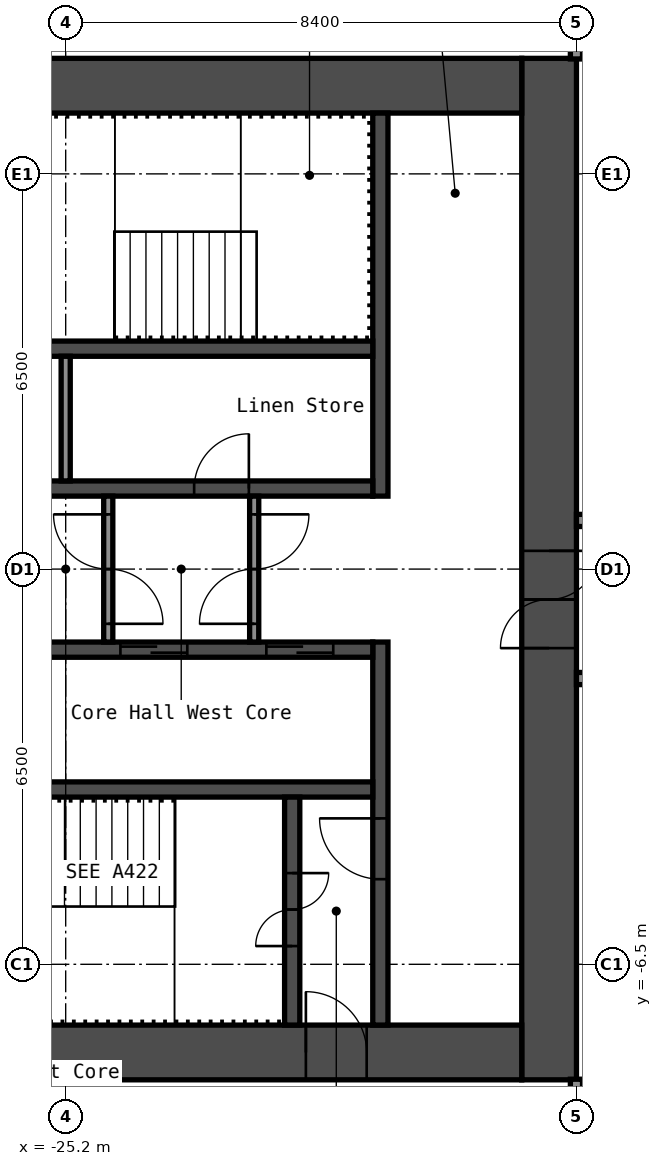
"""IFC4 building model, lengths in metres.
Left out: names, types, materials, properties, quantities, classifications, styles, units other than length and angle.
Written with IfcOpenShell. Run it as: python <this file> out.ifc"""

import sys

from ifc_helpers import new_model, si_unit, direction, frame, frame_2d, origin, place, context, subcontext, project, spatial, rectangle, extrude, element, fill, save


model = new_model("IFC4")
c1 = context("Model", 3, precision=1e-05, world=origin(), true_north=direction((0.0, 1.0)))
c2 = subcontext(c1, "Body", "Model", "MODEL_VIEW")
j1 = project(units=[si_unit("LENGTHUNIT", "METRE"), si_unit("PLANEANGLEUNIT", "RADIAN")], contexts=[c1])
p1 = place(None, origin())
s1 = spatial("IfcSite", under=j1, at=p1, CompositionType="ELEMENT")
p2 = place(p1, origin())
s2 = spatial("IfcBuilding", under=s1, at=p2, CompositionType="ELEMENT")
p3 = place(p2, frame((0.0, 0.0, 143.8)))
s3 = spatial("IfcBuildingStorey", under=s2, at=p3, CompositionType="ELEMENT", Elevation=143.8)
p4 = place(p3, frame((-17.25, -8.4, 0.0), z_axis=(0.0, 0.0, 1.0), x_axis=(0.0, 1.0, 0.0)))
e1 = element("IfcWall", 1, at=p4, inside=s3, PredefinedType="SHEAR", context=c2, shape_type="SweptSolid", body=[
    extrude(rectangle(XDim=16.8, YDim=0.9, at=frame_2d((8.4, 0.0))), origin(), (0.0, 0.0, 1.0), 2.75),
])
p5 = place(p4, frame((7.1, 0.0, 0.0)))
e2 = element("IfcOpeningElement", 2, at=p5, cuts=e1, PredefinedType="OPENING", context=c2, shape_type="SweptSolid", body=[
    extrude(rectangle(XDim=1.6, YDim=2.1, at=frame_2d((0.8, 1.05))), frame((0.0, 0.46, 0.0), z_axis=(0.0, -1.0, 0.0), x_axis=(1.0, 0.0, 0.0)), (0.0, 0.0, 1.0), 0.92),
])
p6 = place(p3, frame((-32.7, 7.95, 0.0), z_axis=(0.0, 0.0, 1.0), x_axis=(1.0, 0.0, 0.0)))
e3 = element("IfcWall", 3, at=p6, inside=s3, PredefinedType="SHEAR", context=c2, shape_type="SweptSolid", body=[
    extrude(rectangle(XDim=15.0, YDim=0.9, at=frame_2d((7.5, 0.0))), origin(), (0.0, 0.0, 1.0), 2.75),
])
p7 = place(p6, frame((3.4, 0.0, 0.0)))
e4 = element("IfcOpeningElement", 4, at=p7, cuts=e3, PredefinedType="OPENING", context=c2, shape_type="SweptSolid", body=[
    extrude(rectangle(XDim=1.2, YDim=2.1, at=frame_2d((0.6, 1.05))), frame((0.0, 0.46, 0.0), z_axis=(0.0, -1.0, 0.0), x_axis=(1.0, 0.0, 0.0)), (0.0, 0.0, 1.0), 0.92),
])
p8 = place(p6, frame((0.75, 0.0, 0.0)))
e5 = element("IfcOpeningElement", 5, at=p8, cuts=e3, PredefinedType="OPENING", context=c2, shape_type="SweptSolid", body=[
    extrude(rectangle(XDim=0.9, YDim=2.1, at=frame_2d((0.45, 1.05))), frame((0.0, 0.46, 0.0), z_axis=(0.0, -1.0, 0.0), x_axis=(1.0, 0.0, 0.0)), (0.0, 0.0, 1.0), 0.92),
])
p9 = place(p3, frame((-32.7, -7.95, 0.0), z_axis=(0.0, 0.0, 1.0), x_axis=(1.0, 0.0, 0.0)))
e6 = element("IfcWall", 6, at=p9, inside=s3, PredefinedType="SHEAR", context=c2, shape_type="SweptSolid", body=[
    extrude(rectangle(XDim=15.0, YDim=0.9, at=frame_2d((7.5, 0.0))), origin(), (0.0, 0.0, 1.0), 2.75),
])
p10 = place(p9, frame((11.45, 0.0, 0.0)))
e7 = element("IfcOpeningElement", 7, at=p10, cuts=e6, PredefinedType="OPENING", context=c2, shape_type="SweptSolid", body=[
    extrude(rectangle(XDim=1.0, YDim=2.1, at=frame_2d((0.5, 1.05))), frame((0.0, 0.46, 0.0), z_axis=(0.0, -1.0, 0.0), x_axis=(1.0, 0.0, 0.0)), (0.0, 0.0, 1.0), 0.92),
])
p11 = place(p3, frame((-20.025, 1.2, 0.0), z_axis=(0.0, 0.0, 1.0), x_axis=(0.0, 1.0, 0.0)))
e8 = element("IfcWall", 8, at=p11, inside=s3, PredefinedType="SHEAR", context=c2, shape_type="SweptSolid", body=[
    extrude(rectangle(XDim=6.3, YDim=0.25, at=frame_2d((3.15, 0.0))), origin(), (0.0, 0.0, 1.0), 2.75),
])
p12 = place(p3, frame((-20.025, -7.5, 0.0), z_axis=(0.0, 0.0, 1.0), x_axis=(0.0, 1.0, 0.0)))
e9 = element("IfcWall", 9, at=p12, inside=s3, PredefinedType="SHEAR", context=c2, shape_type="SweptSolid", body=[
    extrude(rectangle(XDim=6.3, YDim=0.25, at=frame_2d((3.15, 0.0))), origin(), (0.0, 0.0, 1.0), 2.75),
])
p13 = place(p12, frame((2.4, 0.0, 0.0)))
e10 = element("IfcOpeningElement", 10, at=p13, cuts=e9, PredefinedType="OPENING", context=c2, shape_type="SweptSolid", body=[
    extrude(rectangle(XDim=1.0, YDim=2.1, at=frame_2d((0.5, 1.05))), frame((0.0, 0.135, 0.0), z_axis=(0.0, -1.0, 0.0), x_axis=(1.0, 0.0, 0.0)), (0.0, 0.0, 1.0), 0.27),
])
p14 = place(p3, frame((-27.65, 1.325, 0.0), z_axis=(0.0, 0.0, 1.0), x_axis=(1.0, 0.0, 0.0)))
e11 = element("IfcWall", 11, at=p14, inside=s3, PredefinedType="SHEAR", context=c2, shape_type="SweptSolid", body=[
    extrude(rectangle(XDim=7.5, YDim=0.25, at=frame_2d((3.75, 0.0))), origin(), (0.0, 0.0, 1.0), 2.75),
])
p15 = place(p14, frame((4.562, 0.0, 0.0)))
e12 = element("IfcOpeningElement", 12, at=p15, cuts=e11, PredefinedType="OPENING", context=c2, shape_type="SweptSolid", body=[
    extrude(rectangle(XDim=0.9, YDim=2.1, at=frame_2d((0.45, 1.05))), frame((0.0, 0.135, 0.0), z_axis=(0.0, -1.0, 0.0), x_axis=(1.0, 0.0, 0.0)), (0.0, 0.0, 1.0), 0.27),
])
p16 = place(p14, frame((0.863, 0.0, 0.0)))
e13 = element("IfcOpeningElement", 13, at=p16, cuts=e11, PredefinedType="OPENING", context=c2, shape_type="SweptSolid", body=[
    extrude(rectangle(XDim=0.9, YDim=2.1, at=frame_2d((0.45, 1.05))), frame((0.0, 0.135, 0.0), z_axis=(0.0, -1.0, 0.0), x_axis=(1.0, 0.0, 0.0)), (0.0, 0.0, 1.0), 0.27),
])
p17 = place(p3, frame((-27.65, 3.625, 0.0), z_axis=(0.0, 0.0, 1.0), x_axis=(1.0, 0.0, 0.0)))
e14 = element("IfcWall", 14, at=p17, inside=s3, PredefinedType="SHEAR", context=c2, shape_type="SweptSolid", body=[
    extrude(rectangle(XDim=7.5, YDim=0.25, at=frame_2d((3.75, 0.0))), origin(), (0.0, 0.0, 1.0), 2.75),
])
p18 = place(p3, frame((-27.65, -1.325, 0.0), z_axis=(0.0, 0.0, 1.0), x_axis=(1.0, 0.0, 0.0)))
e15 = element("IfcWall", 15, at=p18, inside=s3, PredefinedType="SHEAR", context=c2, shape_type="SweptSolid", body=[
    extrude(rectangle(XDim=7.5, YDim=0.25, at=frame_2d((3.75, 0.0))), origin(), (0.0, 0.0, 1.0), 2.75),
])
p19 = place(p18, frame((5.75, 0.0, 0.0)))
e16 = element("IfcOpeningElement", 16, at=p19, cuts=e15, PredefinedType="OPENING", context=c2, shape_type="SweptSolid", body=[
    extrude(rectangle(XDim=1.1, YDim=2.1, at=frame_2d((0.55, 1.05))), frame((0.0, 0.135, 0.0), z_axis=(0.0, -1.0, 0.0), x_axis=(1.0, 0.0, 0.0)), (0.0, 0.0, 1.0), 0.27),
])
p20 = place(p18, frame((3.35, 0.0, 0.0)))
e17 = element("IfcOpeningElement", 17, at=p20, cuts=e15, PredefinedType="OPENING", context=c2, shape_type="SweptSolid", body=[
    extrude(rectangle(XDim=1.1, YDim=2.1, at=frame_2d((0.55, 1.05))), frame((0.0, 0.135, 0.0), z_axis=(0.0, -1.0, 0.0), x_axis=(1.0, 0.0, 0.0)), (0.0, 0.0, 1.0), 0.27),
])
p21 = place(p18, frame((0.95, 0.0, 0.0)))
e18 = element("IfcOpeningElement", 18, at=p21, cuts=e15, PredefinedType="OPENING", context=c2, shape_type="SweptSolid", body=[
    extrude(rectangle(XDim=1.1, YDim=2.1, at=frame_2d((0.55, 1.05))), frame((0.0, 0.135, 0.0), z_axis=(0.0, -1.0, 0.0), x_axis=(1.0, 0.0, 0.0)), (0.0, 0.0, 1.0), 0.27),
])
p22 = place(p3, frame((-27.65, -3.625, 0.0), z_axis=(0.0, 0.0, 1.0), x_axis=(1.0, 0.0, 0.0)))
e19 = element("IfcWall", 19, at=p22, inside=s3, PredefinedType="SHEAR", context=c2, shape_type="SweptSolid", body=[
    extrude(rectangle(XDim=7.5, YDim=0.25, at=frame_2d((3.75, 0.0))), origin(), (0.0, 0.0, 1.0), 2.75),
])
p23 = place(p3, frame((-21.475, -7.5, 0.0), z_axis=(0.0, 0.0, 1.0), x_axis=(0.0, 1.0, 0.0)))
e20 = element("IfcWall", 20, at=p23, inside=s3, PredefinedType="SHEAR", context=c2, shape_type="SweptSolid", body=[
    extrude(rectangle(XDim=3.75, YDim=0.25, at=frame_2d((1.875, 0.0))), origin(), (0.0, 0.0, 1.0), 2.75),
])
p24 = place(p23, frame((1.3, 0.0, 0.0)))
e21 = element("IfcOpeningElement", 21, at=p24, cuts=e20, PredefinedType="OPENING", context=c2, shape_type="SweptSolid", body=[
    extrude(rectangle(XDim=1.2, YDim=2.1, at=frame_2d((0.6, 1.05))), frame((0.0, 0.135, 0.0), z_axis=(0.0, -1.0, 0.0), x_axis=(1.0, 0.0, 0.0)), (0.0, 0.0, 1.0), 0.27),
])
p25 = place(p3, frame((-22.1, -1.2, 0.0), z_axis=(0.0, 0.0, 1.0), x_axis=(0.0, 1.0, 0.0)))
e22 = element("IfcWall", 22, at=p25, inside=s3, PredefinedType="PARTITIONING", context=c2, shape_type="SweptSolid", body=[
    extrude(rectangle(XDim=2.4, YDim=0.15, at=frame_2d((1.2, 0.0))), origin(), (0.0, 0.0, 1.0), 2.75),
])
p26 = place(p25, frame((0.3, 0.0, 0.0)))
e23 = element("IfcOpeningElement", 23, at=p26, cuts=e22, PredefinedType="OPENING", context=c2, shape_type="SweptSolid", body=[
    extrude(rectangle(XDim=1.8, YDim=2.1, at=frame_2d((0.9, 1.05))), frame((0.0, 0.085, 0.0), z_axis=(0.0, -1.0, 0.0), x_axis=(1.0, 0.0, 0.0)), (0.0, 0.0, 1.0), 0.17),
])
p27 = place(p3, frame((-24.5, -1.2, 0.0), z_axis=(0.0, 0.0, 1.0), x_axis=(0.0, 1.0, 0.0)))
e24 = element("IfcWall", 24, at=p27, inside=s3, PredefinedType="PARTITIONING", context=c2, shape_type="SweptSolid", body=[
    extrude(rectangle(XDim=2.4, YDim=0.15, at=frame_2d((1.2, 0.0))), origin(), (0.0, 0.0, 1.0), 2.75),
])
p28 = place(p27, frame((0.3, 0.0, 0.0)))
e25 = element("IfcOpeningElement", 25, at=p28, cuts=e24, PredefinedType="OPENING", context=c2, shape_type="SweptSolid", body=[
    extrude(rectangle(XDim=1.8, YDim=2.1, at=frame_2d((0.9, 1.05))), frame((0.0, 0.085, 0.0), z_axis=(0.0, -1.0, 0.0), x_axis=(1.0, 0.0, 0.0)), (0.0, 0.0, 1.0), 0.17),
])
p29 = place(p3, frame((-25.2, 1.45, 0.0), z_axis=(0.0, 0.0, 1.0), x_axis=(0.0, 1.0, 0.0)))
e26 = element("IfcWall", 26, at=p29, inside=s3, PredefinedType="PARTITIONING", context=c2, shape_type="SweptSolid", body=[
    extrude(rectangle(XDim=2.05, YDim=0.15, at=frame_2d((1.025, 0.0))), origin(), (0.0, 0.0, 1.0), 2.75),
])
p30 = place(p3, frame((-16.8, -1.8, 0.0), z_axis=(0.0, 0.0, 1.0), x_axis=(1.0, 0.0, 0.0)))
e27 = element("IfcWall", 27, at=p30, inside=s3, PredefinedType="PARTITIONING", context=c2, shape_type="SweptSolid", body=[
    extrude(rectangle(XDim=33.6, YDim=0.2, at=frame_2d((16.8, 0.0))), origin(), (0.0, 0.0, 1.0), 2.75),
])
p31 = place(p30, frame((1.6, 0.0, 0.0)))
e28 = element("IfcOpeningElement", 28, at=p31, cuts=e27, PredefinedType="OPENING", context=c2, shape_type="SweptSolid", body=[
    extrude(rectangle(XDim=1.0, YDim=2.1, at=frame_2d((0.5, 1.05))), frame((0.0, 0.11, 0.0), z_axis=(0.0, -1.0, 0.0), x_axis=(1.0, 0.0, 0.0)), (0.0, 0.0, 1.0), 0.22),
])
p32 = place(p30, frame((13.9, 0.0, 0.0)))
e29 = element("IfcOpeningElement", 29, at=p32, cuts=e27, PredefinedType="OPENING", context=c2, shape_type="SweptSolid", body=[
    extrude(rectangle(XDim=1.0, YDim=2.1, at=frame_2d((0.5, 1.05))), frame((0.0, 0.11, 0.0), z_axis=(0.0, -1.0, 0.0), x_axis=(1.0, 0.0, 0.0)), (0.0, 0.0, 1.0), 0.22),
])
p33 = place(p30, frame((22.6, 0.0, 0.0)))
e30 = element("IfcOpeningElement", 30, at=p33, cuts=e27, PredefinedType="OPENING", context=c2, shape_type="SweptSolid", body=[
    extrude(rectangle(XDim=1.0, YDim=2.1, at=frame_2d((0.5, 1.05))), frame((0.0, 0.11, 0.0), z_axis=(0.0, -1.0, 0.0), x_axis=(1.0, 0.0, 0.0)), (0.0, 0.0, 1.0), 0.22),
])
p34 = place(p30, frame((26.8, 0.0, 0.0)))
e31 = element("IfcOpeningElement", 31, at=p34, cuts=e27, PredefinedType="OPENING", context=c2, shape_type="SweptSolid", body=[
    extrude(rectangle(XDim=1.0, YDim=2.1, at=frame_2d((0.5, 1.05))), frame((0.0, 0.11, 0.0), z_axis=(0.0, -1.0, 0.0), x_axis=(1.0, 0.0, 0.0)), (0.0, 0.0, 1.0), 0.22),
])
p35 = place(p3, frame((-16.8, 0.8, 0.0), z_axis=(0.0, 0.0, 1.0), x_axis=(1.0, 0.0, 0.0)))
e32 = element("IfcWall", 32, at=p35, inside=s3, PredefinedType="PARTITIONING", context=c2, shape_type="SweptSolid", body=[
    extrude(rectangle(XDim=33.6, YDim=0.2, at=frame_2d((16.8, 0.0))), origin(), (0.0, 0.0, 1.0), 2.75),
])
p36 = place(p35, frame((1.6, 0.0, 0.0)))
e33 = element("IfcOpeningElement", 33, at=p36, cuts=e32, PredefinedType="OPENING", context=c2, shape_type="SweptSolid", body=[
    extrude(rectangle(XDim=1.0, YDim=2.1, at=frame_2d((0.5, 1.05))), frame((0.0, 0.11, 0.0), z_axis=(0.0, -1.0, 0.0), x_axis=(1.0, 0.0, 0.0)), (0.0, 0.0, 1.0), 0.22),
])
p37 = place(p35, frame((14.2, 0.0, 0.0)))
e34 = element("IfcOpeningElement", 34, at=p37, cuts=e32, PredefinedType="OPENING", context=c2, shape_type="SweptSolid", body=[
    extrude(rectangle(XDim=1.0, YDim=2.1, at=frame_2d((0.5, 1.05))), frame((0.0, 0.11, 0.0), z_axis=(0.0, -1.0, 0.0), x_axis=(1.0, 0.0, 0.0)), (0.0, 0.0, 1.0), 0.22),
])
p38 = place(p35, frame((22.6, 0.0, 0.0)))
e35 = element("IfcOpeningElement", 35, at=p38, cuts=e32, PredefinedType="OPENING", context=c2, shape_type="SweptSolid", body=[
    extrude(rectangle(XDim=1.0, YDim=2.1, at=frame_2d((0.5, 1.05))), frame((0.0, 0.11, 0.0), z_axis=(0.0, -1.0, 0.0), x_axis=(1.0, 0.0, 0.0)), (0.0, 0.0, 1.0), 0.22),
])
p39 = place(p35, frame((26.8, 0.0, 0.0)))
e36 = element("IfcOpeningElement", 36, at=p39, cuts=e32, PredefinedType="OPENING", context=c2, shape_type="SweptSolid", body=[
    extrude(rectangle(XDim=1.0, YDim=2.1, at=frame_2d((0.5, 1.05))), frame((0.0, 0.11, 0.0), z_axis=(0.0, -1.0, 0.0), x_axis=(1.0, 0.0, 0.0)), (0.0, 0.0, 1.0), 0.22),
])
p40 = place(p3, frame((-16.8, -19.3, 0.0), z_axis=(0.0, 0.0, 1.0), x_axis=(0.0, 1.0, 0.0)))
e37 = element("IfcWall", 37, at=p40, inside=s3, PredefinedType="PARTITIONING", context=c2, shape_type="SweptSolid", body=[
    extrude(rectangle(XDim=10.91, YDim=0.2, at=frame_2d((5.455, 0.0))), origin(), (0.0, 0.0, 1.0), 2.75),
])
p41 = place(p3, frame((-16.8, 8.39, 0.0), z_axis=(0.0, 0.0, 1.0), x_axis=(0.0, 1.0, 0.0)))
e38 = element("IfcWall", 38, at=p41, inside=s3, PredefinedType="PARTITIONING", context=c2, shape_type="SweptSolid", body=[
    extrude(rectangle(XDim=9.91, YDim=0.2, at=frame_2d((4.955, 0.0))), origin(), (0.0, 0.0, 1.0), 2.75),
])
p42 = place(p5, origin())
e39 = element("IfcDoor", 39, at=p42, inside=s3, OperationType="DOUBLE_DOOR_SINGLE_SWING", PredefinedType="DOOR", context=c2, shape_type="SweptSolid", body=[
    extrude(rectangle(XDim=1.6, YDim=2.1, at=frame_2d((0.8, 1.05))), frame((0.0, 0.025, 0.0), z_axis=(0.0, -1.0, 0.0), x_axis=(1.0, 0.0, 0.0)), (0.0, 0.0, 1.0), 0.05),
])
fill(e2, e39)
p43 = place(p10, origin())
e40 = element("IfcDoor", 40, at=p43, inside=s3, OperationType="SINGLE_SWING_RIGHT", PredefinedType="DOOR", context=c2, shape_type="SweptSolid", body=[
    extrude(rectangle(XDim=1.0, YDim=2.1, at=frame_2d((0.5, 1.05))), frame((0.0, 0.025, 0.0), z_axis=(0.0, -1.0, 0.0), x_axis=(1.0, 0.0, 0.0)), (0.0, 0.0, 1.0), 0.05),
])
fill(e7, e40)
p44 = place(p24, origin())
e41 = element("IfcDoor", 41, at=p44, inside=s3, OperationType="DOUBLE_DOOR_SINGLE_SWING", PredefinedType="DOOR", context=c2, shape_type="SweptSolid", body=[
    extrude(rectangle(XDim=1.2, YDim=2.1, at=frame_2d((0.6, 1.05))), frame((0.0, 0.025, 0.0), z_axis=(0.0, -1.0, 0.0), x_axis=(1.0, 0.0, 0.0)), (0.0, 0.0, 1.0), 0.05),
])
fill(e21, e41)
p45 = place(p13, origin())
e42 = element("IfcDoor", 42, at=p45, inside=s3, OperationType="SINGLE_SWING_LEFT", PredefinedType="DOOR", context=c2, shape_type="SweptSolid", body=[
    extrude(rectangle(XDim=1.0, YDim=2.1, at=frame_2d((0.5, 1.05))), frame((0.0, 0.025, 0.0), z_axis=(0.0, -1.0, 0.0), x_axis=(1.0, 0.0, 0.0)), (0.0, 0.0, 1.0), 0.05),
])
fill(e10, e42)
p46 = place(p26, origin())
e43 = element("IfcDoor", 43, at=p46, inside=s3, OperationType="DOUBLE_DOOR_SINGLE_SWING", PredefinedType="DOOR", context=c2, shape_type="SweptSolid", body=[
    extrude(rectangle(XDim=1.8, YDim=2.1, at=frame_2d((0.9, 1.05))), frame((0.0, 0.025, 0.0), z_axis=(0.0, -1.0, 0.0), x_axis=(1.0, 0.0, 0.0)), (0.0, 0.0, 1.0), 0.05),
])
fill(e23, e43)
p47 = place(p28, origin())
e44 = element("IfcDoor", 44, at=p47, inside=s3, OperationType="DOUBLE_DOOR_SINGLE_SWING", PredefinedType="DOOR", context=c2, shape_type="SweptSolid", body=[
    extrude(rectangle(XDim=1.8, YDim=2.1, at=frame_2d((0.9, 1.05))), frame((0.0, 0.025, 0.0), z_axis=(0.0, -1.0, 0.0), x_axis=(1.0, 0.0, 0.0)), (0.0, 0.0, 1.0), 0.05),
])
fill(e25, e44)
p48 = place(p15, origin())
e45 = element("IfcDoor", 45, at=p48, inside=s3, OperationType="SINGLE_SWING_LEFT", PredefinedType="DOOR", context=c2, shape_type="SweptSolid", body=[
    extrude(rectangle(XDim=0.9, YDim=2.1, at=frame_2d((0.45, 1.05))), frame((0.0, 0.025, 0.0), z_axis=(0.0, -1.0, 0.0), x_axis=(1.0, 0.0, 0.0)), (0.0, 0.0, 1.0), 0.05),
])
fill(e12, e45)
p49 = place(p19, origin())
e46 = element("IfcDoor", 46, at=p49, inside=s3, OperationType="DOUBLE_DOOR_SLIDING", PredefinedType="DOOR", context=c2, shape_type="SweptSolid", body=[
    extrude(rectangle(XDim=1.1, YDim=2.1, at=frame_2d((0.55, 1.05))), frame((0.0, 0.025, 0.0), z_axis=(0.0, -1.0, 0.0), x_axis=(1.0, 0.0, 0.0)), (0.0, 0.0, 1.0), 0.05),
])
fill(e16, e46)
p50 = place(p20, origin())
e47 = element("IfcDoor", 47, at=p50, inside=s3, OperationType="DOUBLE_DOOR_SLIDING", PredefinedType="DOOR", context=c2, shape_type="SweptSolid", body=[
    extrude(rectangle(XDim=1.1, YDim=2.1, at=frame_2d((0.55, 1.05))), frame((0.0, 0.025, 0.0), z_axis=(0.0, -1.0, 0.0), x_axis=(1.0, 0.0, 0.0)), (0.0, 0.0, 1.0), 0.05),
])
fill(e17, e47)
save(model, sys.argv[1])
